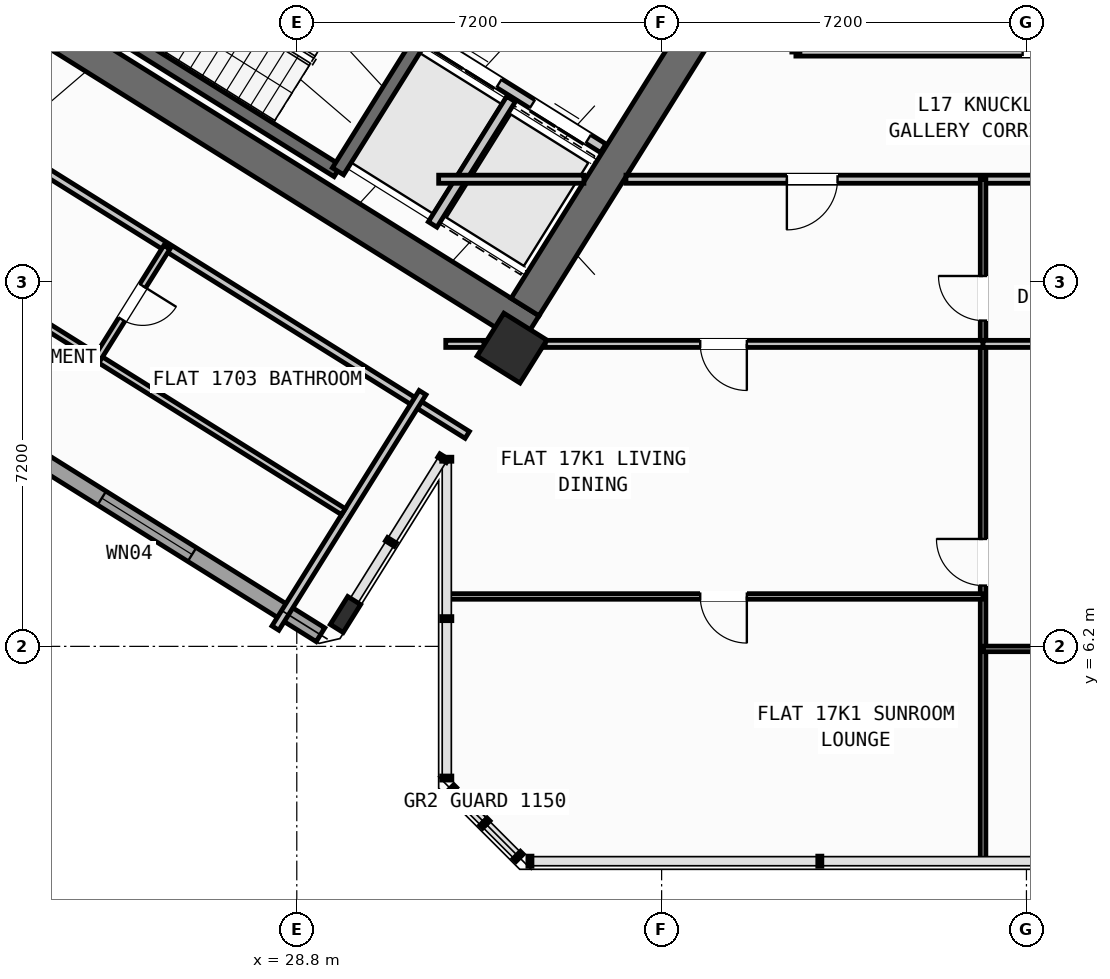
"""IFC4 building model, lengths in metres.
Left out: names, types, materials, properties, quantities, classifications, styles, units other than length and angle.
Written with IfcOpenShell. Run it as: python <this file> out.ifc"""

import sys

from ifc_helpers import new_model, si_unit, direction, frame, frame_2d, origin, origin_2d, place, context, subcontext, project, spatial, rectangle, hollow_rectangle, i_section, extrude, source, transform, mapped, element, fill, save


model = new_model("IFC4")
c1 = context("Model", 3, precision=1e-05, world=origin(), true_north=direction((0.0, 1.0)))
c2 = subcontext(c1, "Body", "Model", "MODEL_VIEW")
j1 = project(units=[si_unit("LENGTHUNIT", "METRE"), si_unit("PLANEANGLEUNIT", "RADIAN")], contexts=[c1])
p1 = place(None, origin())
s1 = spatial("IfcSite", under=j1, at=p1, CompositionType="ELEMENT")
p2 = place(p1, origin())
s2 = spatial("IfcBuilding", under=s1, at=p2, CompositionType="ELEMENT")
p3 = place(p2, frame((0.0, 0.0, 67.2)))
s3 = spatial("IfcBuildingStorey", under=s2, at=p3, CompositionType="ELEMENT", Elevation=67.2)
p4 = place(p3, frame((33.409, 12.45, 0.0), z_axis=(0.0, 0.0, 1.0), x_axis=(-0.848051132073, 0.529914405721, 0.0)))
e1 = element("IfcWall", 1, at=p4, inside=s3, PredefinedType="SHEAR", context=c2, shape_type="SweptSolid", body=[
    extrude(rectangle(XDim=13.24, YDim=0.65, at=frame_2d((6.62, 0.0))), origin(), (0.0, 0.0, 1.0), 4.22),
])
p5 = place(p3, frame((36.683, 18.304, 0.0), z_axis=(0.0, 0.0, 1.0), x_axis=(-0.529899109053, -0.848060690178, 0.0)))
e2 = element("IfcWall", 2, at=p5, inside=s3, PredefinedType="SHEAR", context=c2, shape_type="SweptSolid", body=[
    extrude(rectangle(XDim=6.375, YDim=0.65, at=frame_2d((3.188, 0.0))), origin(), (0.0, 0.0, 1.0), 4.22),
])
m1 = source(origin(), c2, "Body", "SweptSolid", [
    extrude(hollow_rectangle(XDim=1.0, YDim=1.0, WallThickness=0.04, at=origin_2d()), origin(), (0.0, 0.0, 1.0), 4.5),
])
p6 = place(p3, frame((33.046, 12.087, 0.0), z_axis=(0.0, 0.0, 1.0), x_axis=(-0.848048096156, 0.529919264233, 0.0)))
e3 = element("IfcColumn", 3, at=p6, inside=s3, PredefinedType="COLUMN", context=c2, shape_type="MappedRepresentation", body=[
    mapped(m1, transform((0.0, 0.0, 0.0), scale=1.0)),
])
m2 = source(origin(), c2, "Body", "SweptSolid", [
    extrude(i_section(OverallWidth=0.3, OverallDepth=0.65, WebThickness=0.016, FlangeThickness=0.031, at=origin_2d()), origin(), (0.0, 0.0, 1.0), 4.5),
])
p7 = place(p3, frame((29.761, 6.829, 0.0), z_axis=(0.0, 0.0, 1.0), x_axis=(-0.848048096156, 0.529919264233, 0.0)))
e4 = element("IfcColumn", 4, at=p7, inside=s3, PredefinedType="COLUMN", context=c2, shape_type="MappedRepresentation", body=[
    mapped(m2, transform((0.0, 0.0, 0.0), scale=1.0)),
])
p8 = place(p3, frame((29.268, 6.429, 0.0), z_axis=(0.0, 0.0, 1.0), x_axis=(-0.848049971435, 0.529916263149, 0.0)))
e5 = element("IfcWall", 5, at=p8, inside=s3, PredefinedType="STANDARD", context=c2, shape_type="SweptSolid", body=[
    extrude(rectangle(XDim=31.588, YDim=0.32, at=frame_2d((15.794, 0.0))), origin(), (0.0, 0.0, 1.0), 4.22),
])
p9 = place(p8, frame((16.362, 0.0, 0.0)))
e6 = element("IfcOpeningElement", 6, at=p9, cuts=e5, PredefinedType="OPENING", context=c2, shape_type="SweptSolid", body=[
    extrude(rectangle(XDim=1.2, YDim=2.15, at=frame_2d((0.6, 1.075))), frame((0.0, 0.17, 0.0), z_axis=(0.0, -1.0, 0.0), x_axis=(1.0, 0.0, 0.0)), (0.0, 0.0, 1.0), 0.34),
])
p10 = place(p8, frame((2.989, 0.0, 0.8)))
e7 = element("IfcOpeningElement", 7, at=p10, cuts=e5, PredefinedType="OPENING", context=c2, shape_type="SweptSolid", body=[
    extrude(rectangle(XDim=2.1, YDim=1.55, at=frame_2d((1.05, 0.775))), frame((0.0, 0.17, 0.0), z_axis=(0.0, -1.0, 0.0), x_axis=(1.0, 0.0, 0.0)), (0.0, 0.0, 1.0), 0.34),
])
p11 = place(p8, frame((8.359, 0.0, 0.8)))
e8 = element("IfcOpeningElement", 8, at=p11, cuts=e5, PredefinedType="OPENING", context=c2, shape_type="SweptSolid", body=[
    extrude(rectangle(XDim=2.1, YDim=1.55, at=frame_2d((1.05, 0.775))), frame((0.0, 0.17, 0.0), z_axis=(0.0, -1.0, 0.0), x_axis=(1.0, 0.0, 0.0)), (0.0, 0.0, 1.0), 0.34),
])
p12 = place(p8, frame((13.284, 0.0, 0.95)))
e9 = element("IfcOpeningElement", 9, at=p12, cuts=e5, PredefinedType="OPENING", context=c2, shape_type="SweptSolid", body=[
    extrude(rectangle(XDim=1.2, YDim=1.4, at=frame_2d((0.6, 0.7))), frame((0.0, 0.17, 0.0), z_axis=(0.0, -1.0, 0.0), x_axis=(1.0, 0.0, 0.0)), (0.0, 0.0, 1.0), 0.34),
])
p13 = place(p8, frame((29.188, 0.0, 0.95)))
e10 = element("IfcOpeningElement", 10, at=p13, cuts=e5, PredefinedType="OPENING", context=c2, shape_type="SweptSolid", body=[
    extrude(rectangle(XDim=1.2, YDim=1.4, at=frame_2d((0.6, 0.7))), frame((0.0, 0.17, 0.0), z_axis=(0.0, -1.0, 0.0), x_axis=(1.0, 0.0, 0.0)), (0.0, 0.0, 1.0), 0.34),
])
p14 = place(p8, frame((19.11, 0.0, 1.0)))
e11 = element("IfcOpeningElement", 11, at=p14, cuts=e5, PredefinedType="OPENING", context=c2, shape_type="SweptSolid", body=[
    extrude(rectangle(XDim=0.9, YDim=1.25, at=frame_2d((0.45, 0.625))), frame((0.0, 0.17, 0.0), z_axis=(0.0, -1.0, 0.0), x_axis=(1.0, 0.0, 0.0)), (0.0, 0.0, 1.0), 0.34),
])
p15 = place(p8, frame((21.226, 0.0, 1.0)))
e12 = element("IfcOpeningElement", 12, at=p15, cuts=e5, PredefinedType="OPENING", context=c2, shape_type="SweptSolid", body=[
    extrude(rectangle(XDim=0.9, YDim=1.25, at=frame_2d((0.45, 0.625))), frame((0.0, 0.17, 0.0), z_axis=(0.0, -1.0, 0.0), x_axis=(1.0, 0.0, 0.0)), (0.0, 0.0, 1.0), 0.34),
])
p16 = place(p8, frame((23.014, 0.0, 1.0)))
e13 = element("IfcOpeningElement", 13, at=p16, cuts=e5, PredefinedType="OPENING", context=c2, shape_type="SweptSolid", body=[
    extrude(rectangle(XDim=0.9, YDim=1.25, at=frame_2d((0.45, 0.625))), frame((0.0, 0.17, 0.0), z_axis=(0.0, -1.0, 0.0), x_axis=(1.0, 0.0, 0.0)), (0.0, 0.0, 1.0), 0.34),
])
p17 = place(p8, frame((24.802, 0.0, 1.0)))
e14 = element("IfcOpeningElement", 14, at=p17, cuts=e5, PredefinedType="OPENING", context=c2, shape_type="SweptSolid", body=[
    extrude(rectangle(XDim=0.9, YDim=1.25, at=frame_2d((0.45, 0.625))), frame((0.0, 0.17, 0.0), z_axis=(0.0, -1.0, 0.0), x_axis=(1.0, 0.0, 0.0)), (0.0, 0.0, 1.0), 0.34),
])
p18 = place(p8, frame((26.59, 0.0, 1.0)))
e15 = element("IfcOpeningElement", 15, at=p18, cuts=e5, PredefinedType="OPENING", context=c2, shape_type="SweptSolid", body=[
    extrude(rectangle(XDim=0.9, YDim=1.25, at=frame_2d((0.45, 0.625))), frame((0.0, 0.17, 0.0), z_axis=(0.0, -1.0, 0.0), x_axis=(1.0, 0.0, 0.0)), (0.0, 0.0, 1.0), 0.34),
])
p19 = place(p3, frame((29.605, 15.581, 0.0), z_axis=(0.0, 0.0, 1.0), x_axis=(-0.848036911448, 0.529937163087, 0.0)))
e16 = element("IfcWall", 16, at=p19, inside=s3, PredefinedType="SHEAR", context=c2, shape_type="SweptSolid", body=[
    extrude(rectangle(XDim=7.46, YDim=0.26, at=frame_2d((3.73, 0.0))), origin(), (0.0, 0.0, 1.0), 4.22),
])
p20 = place(p3, frame((31.288, 18.256, 0.0), z_axis=(0.0, 0.0, 1.0), x_axis=(-0.529943379326, -0.848033026897, 0.0)))
e17 = element("IfcWall", 17, at=p20, inside=s3, PredefinedType="SHEAR", context=c2, shape_type="SweptSolid", body=[
    extrude(rectangle(XDim=3.16, YDim=0.26, at=frame_2d((1.58, 0.0))), origin(), (0.0, 0.0, 1.0), 4.22),
])
p21 = place(p3, frame((34.848, 16.031, 0.0), z_axis=(0.0, 0.0, 1.0), x_axis=(-0.848044042236, 0.529925751807, 0.0)))
e18 = element("IfcWall", 18, at=p21, inside=s3, PredefinedType="STANDARD", context=c2, shape_type="SweptSolid", body=[
    extrude(rectangle(XDim=4.198, YDim=0.2, at=frame_2d((2.099, 0.0))), origin(), (0.0, 0.0, 1.0), 4.21),
])
p22 = place(p21, frame((0.348, 0.0, 0.0)))
e19 = element("IfcOpeningElement", 19, at=p22, cuts=e18, PredefinedType="OPENING", context=c2, shape_type="SweptSolid", body=[
    extrude(rectangle(XDim=1.3, YDim=2.2, at=frame_2d((0.65, 1.1))), frame((0.0, 0.11, 0.0), z_axis=(0.0, -1.0, 0.0), x_axis=(1.0, 0.0, 0.0)), (0.0, 0.0, 1.0), 0.22),
])
p23 = place(p21, frame((2.423, 0.0, 0.0)))
e20 = element("IfcOpeningElement", 20, at=p23, cuts=e18, PredefinedType="OPENING", context=c2, shape_type="SweptSolid", body=[
    extrude(rectangle(XDim=1.45, YDim=2.25, at=frame_2d((0.725, 1.125))), frame((0.0, 0.11, 0.0), z_axis=(0.0, -1.0, 0.0), x_axis=(1.0, 0.0, 0.0)), (0.0, 0.0, 1.0), 0.22),
])
p24 = place(p3, frame((33.029, 17.003, 0.0), z_axis=(0.0, 0.0, 1.0), x_axis=(-0.529916267533, -0.848049968695, 0.0)))
e21 = element("IfcWall", 21, at=p24, inside=s3, PredefinedType="STANDARD", context=c2, shape_type="SweptSolid", body=[
    extrude(rectangle(XDim=2.92, YDim=0.2, at=frame_2d((1.46, 0.0))), origin(), (0.0, 0.0, 1.0), 4.21),
])
p25 = place(p3, frame((23.899, 26.529, 0.0), z_axis=(0.0, 0.0, 1.0), x_axis=(-0.529917716469, -0.848049063305, 0.0)))
e22 = element("IfcWall", 22, at=p25, inside=s3, PredefinedType="PARTITIONING", context=c2, shape_type="SweptSolid", body=[
    extrude(rectangle(XDim=14.05, YDim=0.16, at=frame_2d((7.025, 0.0))), origin(), (0.0, 0.0, 1.0), 4.21),
])
p26 = place(p3, frame((32.164, 10.374, 0.0), z_axis=(0.0, 0.0, 1.0), x_axis=(-0.848044107957, 0.529925646633, 0.0)))
e23 = element("IfcWall", 23, at=p26, inside=s3, PredefinedType="PARTITIONING", context=c2, shape_type="SweptSolid", body=[
    extrude(rectangle(XDim=15.57, YDim=0.16, at=frame_2d((7.785, 0.0))), origin(), (0.0, 0.0, 1.0), 4.21),
])
p27 = place(p26, frame((10.83, 0.0, 0.0)))
e24 = element("IfcOpeningElement", 24, at=p27, cuts=e23, PredefinedType="OPENING", context=c2, shape_type="SweptSolid", body=[
    extrude(rectangle(XDim=1.0, YDim=2.1, at=frame_2d((0.5, 1.05))), frame((0.0, 0.09, 0.0), z_axis=(0.0, -1.0, 0.0), x_axis=(1.0, 0.0, 0.0)), (0.0, 0.0, 1.0), 0.18),
])
p28 = place(p3, frame((31.282, 11.208, 0.0), z_axis=(0.0, 0.0, 1.0), x_axis=(-0.529938869374, -0.84803584519, 0.0)))
e25 = element("IfcWall", 25, at=p28, inside=s3, PredefinedType="PARTITIONING", context=c2, shape_type="SweptSolid", body=[
    extrude(rectangle(XDim=5.48, YDim=0.16, at=frame_2d((2.74, 0.0))), origin(), (0.0, 0.0, 1.0), 4.21),
])
p29 = place(p3, frame((29.72, 8.859, 0.0), z_axis=(0.0, 0.0, 1.0), x_axis=(-0.848049134363, 0.529917602752, 0.0)))
e26 = element("IfcWall", 26, at=p29, inside=s3, PredefinedType="PLUMBINGWALL", context=c2, shape_type="SweptSolid", body=[
    extrude(rectangle(XDim=14.3, YDim=0.14, at=frame_2d((7.15, 0.0))), origin(), (0.0, 0.0, 1.0), 4.21),
])
p30 = place(p29, frame((9.57, 0.0, 0.0)))
e27 = element("IfcOpeningElement", 27, at=p30, cuts=e26, PredefinedType="OPENING", context=c2, shape_type="SweptSolid", body=[
    extrude(rectangle(XDim=0.92, YDim=2.08, at=frame_2d((0.46, 1.04))), frame((0.0, 0.08, 0.0), z_axis=(0.0, -1.0, 0.0), x_axis=(1.0, 0.0, 0.0)), (0.0, 0.0, 1.0), 0.16),
])
p31 = place(p3, frame((26.237, 14.078, 0.0), z_axis=(0.0, 0.0, 1.0), x_axis=(-0.52995640672, -0.848024885824, 0.0)))
e28 = element("IfcWall", 28, at=p31, inside=s3, PredefinedType="PLUMBINGWALL", context=c2, shape_type="SweptSolid", body=[
    extrude(rectangle(XDim=2.58, YDim=0.14, at=frame_2d((1.29, 0.0))), origin(), (0.0, 0.0, 1.0), 4.21),
])
p32 = place(p31, frame((0.9, 0.0, 0.0)))
e29 = element("IfcOpeningElement", 29, at=p32, cuts=e28, PredefinedType="OPENING", context=c2, shape_type="SweptSolid", body=[
    extrude(rectangle(XDim=0.78, YDim=2.05, at=frame_2d((0.39, 1.025))), frame((0.0, 0.08, 0.0), z_axis=(0.0, -1.0, 0.0), x_axis=(1.0, 0.0, 0.0)), (0.0, 0.0, 1.0), 0.16),
])
p33 = place(p3, frame((31.6, 15.42, 0.0), z_axis=(0.0, 0.0, 1.0), x_axis=(1.0, 0.0, 0.0)))
e30 = element("IfcWall", 30, at=p33, inside=s3, PredefinedType="PARTITIONING", context=c2, shape_type="SweptSolid", body=[
    extrude(rectangle(XDim=2.866, YDim=0.16, at=frame_2d((1.433, 0.0))), origin(), (0.0, 0.0, 1.0), 4.21),
])
p34 = place(p3, frame((35.296, 15.42, 0.0), z_axis=(0.0, 0.0, 1.0), x_axis=(1.0, 0.0, 0.0)))
e31 = element("IfcWall", 31, at=p34, inside=s3, PredefinedType="PARTITIONING", context=c2, shape_type="SweptSolid", body=[
    extrude(rectangle(XDim=15.311, YDim=0.16, at=frame_2d((7.655, 0.0))), origin(), (0.0, 0.0, 1.0), 4.21),
])
p35 = place(p34, frame((3.176, 0.0, 0.0)))
e32 = element("IfcOpeningElement", 32, at=p35, cuts=e31, PredefinedType="OPENING", context=c2, shape_type="SweptSolid", body=[
    extrude(rectangle(XDim=1.0, YDim=2.1, at=frame_2d((0.5, 1.05))), frame((0.0, 0.09, 0.0), z_axis=(0.0, -1.0, 0.0), x_axis=(1.0, 0.0, 0.0)), (0.0, 0.0, 1.0), 0.18),
])
p36 = place(p3, frame((38.65, 17.93, 0.0), z_axis=(0.0, 0.0, 1.0), x_axis=(1.0, 0.0, 0.0)))
e33 = element("IfcWall", 33, at=p36, inside=s3, PredefinedType="PARTITIONING", context=c2, shape_type="SweptSolid", body=[
    extrude(rectangle(XDim=9.95, YDim=0.16, at=frame_2d((4.975, 0.0))), origin(), (0.0, 0.0, 1.0), 4.21),
])
p37 = place(p36, frame((4.475, 0.0, 0.0)))
e34 = element("IfcOpeningElement", 34, at=p37, cuts=e33, PredefinedType="OPENING", context=c2, shape_type="SweptSolid", body=[
    extrude(rectangle(XDim=1.0, YDim=2.1, at=frame_2d((0.5, 1.05))), frame((0.0, 0.09, 0.0), z_axis=(0.0, -1.0, 0.0), x_axis=(1.0, 0.0, 0.0)), (0.0, 0.0, 1.0), 0.18),
])
p38 = place(p3, frame((42.344, 1.96, 0.0), z_axis=(0.0, 0.0, 1.0), x_axis=(0.0, 1.0, 0.0)))
e35 = element("IfcWall", 35, at=p38, inside=s3, PredefinedType="PARTITIONING", context=c2, shape_type="SweptSolid", body=[
    extrude(rectangle(XDim=13.46, YDim=0.11, at=frame_2d((6.73, 0.0))), origin(), (0.0, 0.0, 1.0), 4.21),
])
p39 = place(p38, frame((5.44, 0.0, 0.0)))
e36 = element("IfcOpeningElement", 36, at=p39, cuts=e35, PredefinedType="OPENING", context=c2, shape_type="SweptSolid", body=[
    extrude(rectangle(XDim=0.92, YDim=2.08, at=frame_2d((0.46, 1.04))), frame((0.0, 0.065, 0.0), z_axis=(0.0, -1.0, 0.0), x_axis=(1.0, 0.0, 0.0)), (0.0, 0.0, 1.0), 0.13),
])
p40 = place(p38, frame((10.67, 0.0, 0.0)))
e37 = element("IfcOpeningElement", 37, at=p40, cuts=e35, PredefinedType="OPENING", context=c2, shape_type="SweptSolid", body=[
    extrude(rectangle(XDim=0.88, YDim=2.08, at=frame_2d((0.44, 1.04))), frame((0.0, 0.065, 0.0), z_axis=(0.0, -1.0, 0.0), x_axis=(1.0, 0.0, 0.0)), (0.0, 0.0, 1.0), 0.13),
])
p41 = place(p3, frame((31.74, 12.17, 0.0), z_axis=(0.0, 0.0, 1.0), x_axis=(1.0, 0.0, 0.0)))
e38 = element("IfcWall", 38, at=p41, inside=s3, PredefinedType="PLUMBINGWALL", context=c2, shape_type="SweptSolid", body=[
    extrude(rectangle(XDim=0.754, YDim=0.14, at=frame_2d((0.377, 0.0))), origin(), (0.0, 0.0, 1.0), 4.21),
])
p42 = place(p3, frame((33.702, 12.17, 0.0), z_axis=(0.0, 0.0, 1.0), x_axis=(1.0, 0.0, 0.0)))
e39 = element("IfcWall", 39, at=p42, inside=s3, PredefinedType="PLUMBINGWALL", context=c2, shape_type="SweptSolid", body=[
    extrude(rectangle(XDim=8.642, YDim=0.14, at=frame_2d((4.321, 0.0))), origin(), (0.0, 0.0, 1.0), 3.395),
])
p43 = place(p42, frame((3.06, 0.0, 0.0)))
e40 = element("IfcOpeningElement", 40, at=p43, cuts=e39, PredefinedType="OPENING", context=c2, shape_type="SweptSolid", body=[
    extrude(rectangle(XDim=0.92, YDim=2.08, at=frame_2d((0.46, 1.04))), frame((0.0, 0.08, 0.0), z_axis=(0.0, -1.0, 0.0), x_axis=(1.0, 0.0, 0.0)), (0.0, 0.0, 1.0), 0.16),
])
p44 = place(p3, frame((42.344, 12.17, 0.0), z_axis=(0.0, 0.0, 1.0), x_axis=(1.0, 0.0, 0.0)))
e41 = element("IfcWall", 41, at=p44, inside=s3, PredefinedType="PLUMBINGWALL", context=c2, shape_type="SweptSolid", body=[
    extrude(rectangle(XDim=9.916, YDim=0.14, at=frame_2d((4.958, 0.0))), origin(), (0.0, 0.0, 1.0), 3.395),
])
p45 = place(p3, frame((31.74, 7.185, 0.0), z_axis=(0.0, 0.0, 1.0), x_axis=(1.0, 0.0, 0.0)))
e42 = element("IfcWall", 42, at=p45, inside=s3, PredefinedType="PARTITIONING", context=c2, shape_type="SweptSolid", body=[
    extrude(rectangle(XDim=10.604, YDim=0.11, at=frame_2d((5.302, 0.0))), origin(), (0.0, 0.0, 1.0), 4.21),
])
p46 = place(p45, frame((5.022, 0.0, 0.0)))
e43 = element("IfcOpeningElement", 43, at=p46, cuts=e42, PredefinedType="OPENING", context=c2, shape_type="SweptSolid", body=[
    extrude(rectangle(XDim=0.92, YDim=2.08, at=frame_2d((0.46, 1.04))), frame((0.0, 0.065, 0.0), z_axis=(0.0, -1.0, 0.0), x_axis=(1.0, 0.0, 0.0)), (0.0, 0.0, 1.0), 0.13),
])
p47 = place(p3, frame((42.344, 6.15, 0.0), z_axis=(0.0, 0.0, 1.0), x_axis=(1.0, 0.0, 0.0)))
e44 = element("IfcWall", 44, at=p47, inside=s3, PredefinedType="PARTITIONING", context=c2, shape_type="SweptSolid", body=[
    extrude(rectangle(XDim=9.916, YDim=0.11, at=frame_2d((4.958, 0.0))), origin(), (0.0, 0.0, 1.0), 4.21),
])
p48 = place(p47, frame((4.268, 0.0, 0.0)))
e45 = element("IfcOpeningElement", 45, at=p48, cuts=e44, PredefinedType="OPENING", context=c2, shape_type="SweptSolid", body=[
    extrude(rectangle(XDim=0.92, YDim=2.08, at=frame_2d((0.46, 1.04))), frame((0.0, 0.065, 0.0), z_axis=(0.0, -1.0, 0.0), x_axis=(1.0, 0.0, 0.0)), (0.0, 0.0, 1.0), 0.13),
])
m3 = source(origin(), c2, "Body", "SweptSolid", [
    extrude(rectangle(XDim=2.1, YDim=1.55, at=frame_2d((1.05, 0.775))), frame((0.0, 0.03, 0.0), z_axis=(0.0, -1.0, 0.0), x_axis=(1.0, 0.0, 0.0)), (0.0, 0.0, 1.0), 0.06),
])
p49 = place(p10, origin())
e46 = element("IfcWindow", 46, at=p49, inside=s3, PartitioningType="SINGLE_PANEL", PredefinedType="WINDOW", context=c2, shape_type="MappedRepresentation", body=[
    mapped(m3, transform((0.0, 0.0, 0.0), scale=1.0)),
])
fill(e7, e46)
m4 = source(origin(), c2, "Body", "SweptSolid", [
    extrude(rectangle(XDim=1.3, YDim=2.2, at=frame_2d((0.65, 1.1))), frame((0.0, 0.025, 0.0), z_axis=(0.0, -1.0, 0.0), x_axis=(1.0, 0.0, 0.0)), (0.0, 0.0, 1.0), 0.05),
])
p50 = place(p22, origin())
e47 = element("IfcDoor", 47, at=p50, inside=s3, OperationType="DOUBLE_DOOR_SLIDING", PredefinedType="DOOR", context=c2, shape_type="MappedRepresentation", body=[
    mapped(m4, transform((0.0, 0.0, 0.0), scale=1.0)),
])
fill(e19, e47)
m5 = source(origin(), c2, "Body", "SweptSolid", [
    extrude(rectangle(XDim=1.45, YDim=2.25, at=frame_2d((0.725, 1.125))), frame((0.0, 0.025, 0.0), z_axis=(0.0, -1.0, 0.0), x_axis=(1.0, 0.0, 0.0)), (0.0, 0.0, 1.0), 0.05),
])
p51 = place(p23, origin())
e48 = element("IfcDoor", 48, at=p51, inside=s3, OperationType="DOUBLE_DOOR_SLIDING", PredefinedType="DOOR", context=c2, shape_type="MappedRepresentation", body=[
    mapped(m5, transform((0.0, 0.0, 0.0), scale=1.0)),
])
fill(e20, e48)
m6 = source(origin(), c2, "Body", "SweptSolid", [
    extrude(rectangle(XDim=0.78, YDim=2.05, at=frame_2d((0.39, 1.025))), frame((0.0, 0.025, 0.0), z_axis=(0.0, -1.0, 0.0), x_axis=(1.0, 0.0, 0.0)), (0.0, 0.0, 1.0), 0.05),
])
p52 = place(p32, origin())
e49 = element("IfcDoor", 49, at=p52, inside=s3, OperationType="SINGLE_SWING_LEFT", PredefinedType="DOOR", context=c2, shape_type="MappedRepresentation", body=[
    mapped(m6, transform((0.0, 0.0, 0.0), scale=1.0)),
])
fill(e29, e49)
m7 = source(origin(), c2, "Body", "SweptSolid", [
    extrude(rectangle(XDim=1.0, YDim=2.1, at=frame_2d((0.5, 1.05))), frame((0.0, 0.025, 0.0), z_axis=(0.0, -1.0, 0.0), x_axis=(1.0, 0.0, 0.0)), (0.0, 0.0, 1.0), 0.05),
])
p53 = place(p37, origin())
e50 = element("IfcDoor", 50, at=p53, inside=s3, OperationType="SINGLE_SWING_RIGHT", PredefinedType="DOOR", context=c2, shape_type="MappedRepresentation", body=[
    mapped(m7, transform((0.0, 0.0, 0.0), scale=1.0)),
])
fill(e34, e50)
m8 = source(origin(), c2, "Body", "SweptSolid", [
    extrude(rectangle(XDim=0.92, YDim=2.08, at=frame_2d((0.46, 1.04))), frame((0.0, 0.025, 0.0), z_axis=(0.0, -1.0, 0.0), x_axis=(1.0, 0.0, 0.0)), (0.0, 0.0, 1.0), 0.05),
])
p54 = place(p46, frame((0.92, 0.0, 0.0), z_axis=(0.0, 0.0, 1.0), x_axis=(-1.0, 0.0, 0.0)))
e51 = element("IfcDoor", 51, at=p54, inside=s3, OperationType="SINGLE_SWING_LEFT", PredefinedType="DOOR", context=c2, shape_type="MappedRepresentation", body=[
    mapped(m8, transform((0.0, 0.0, 0.0), scale=1.0)),
])
fill(e43, e51)
p55 = place(p39, origin())
e52 = element("IfcDoor", 52, at=p55, inside=s3, OperationType="SINGLE_SWING_RIGHT", PredefinedType="DOOR", context=c2, shape_type="MappedRepresentation", body=[
    mapped(m8, transform((0.0, 0.0, 0.0), scale=1.0)),
])
fill(e36, e52)
p56 = place(p35, frame((1.0, 0.0, 0.0), z_axis=(0.0, 0.0, 1.0), x_axis=(-1.0, 0.0, 0.0)))
e53 = element("IfcDoor", 53, at=p56, inside=s3, OperationType="SINGLE_SWING_RIGHT", PredefinedType="DOOR", context=c2, shape_type="MappedRepresentation", body=[
    mapped(m7, transform((0.0, 0.0, 0.0), scale=1.0)),
])
fill(e32, e53)
p57 = place(p43, frame((0.92, 0.0, 0.0), z_axis=(0.0, 0.0, 1.0), x_axis=(-1.0, 0.0, 0.0)))
e54 = element("IfcDoor", 54, at=p57, inside=s3, OperationType="SINGLE_SWING_LEFT", PredefinedType="DOOR", context=c2, shape_type="MappedRepresentation", body=[
    mapped(m8, transform((0.0, 0.0, 0.0), scale=1.0)),
])
fill(e40, e54)
m9 = source(origin(), c2, "Body", "SweptSolid", [
    extrude(rectangle(XDim=0.88, YDim=2.08, at=frame_2d((0.44, 1.04))), frame((0.0, 0.025, 0.0), z_axis=(0.0, -1.0, 0.0), x_axis=(1.0, 0.0, 0.0)), (0.0, 0.0, 1.0), 0.05),
])
p58 = place(p40, origin())
e55 = element("IfcDoor", 55, at=p58, inside=s3, OperationType="SINGLE_SWING_RIGHT", PredefinedType="DOOR", context=c2, shape_type="MappedRepresentation", body=[
    mapped(m9, transform((0.0, 0.0, 0.0), scale=1.0)),
])
fill(e37, e55)
save(model, sys.argv[1])
